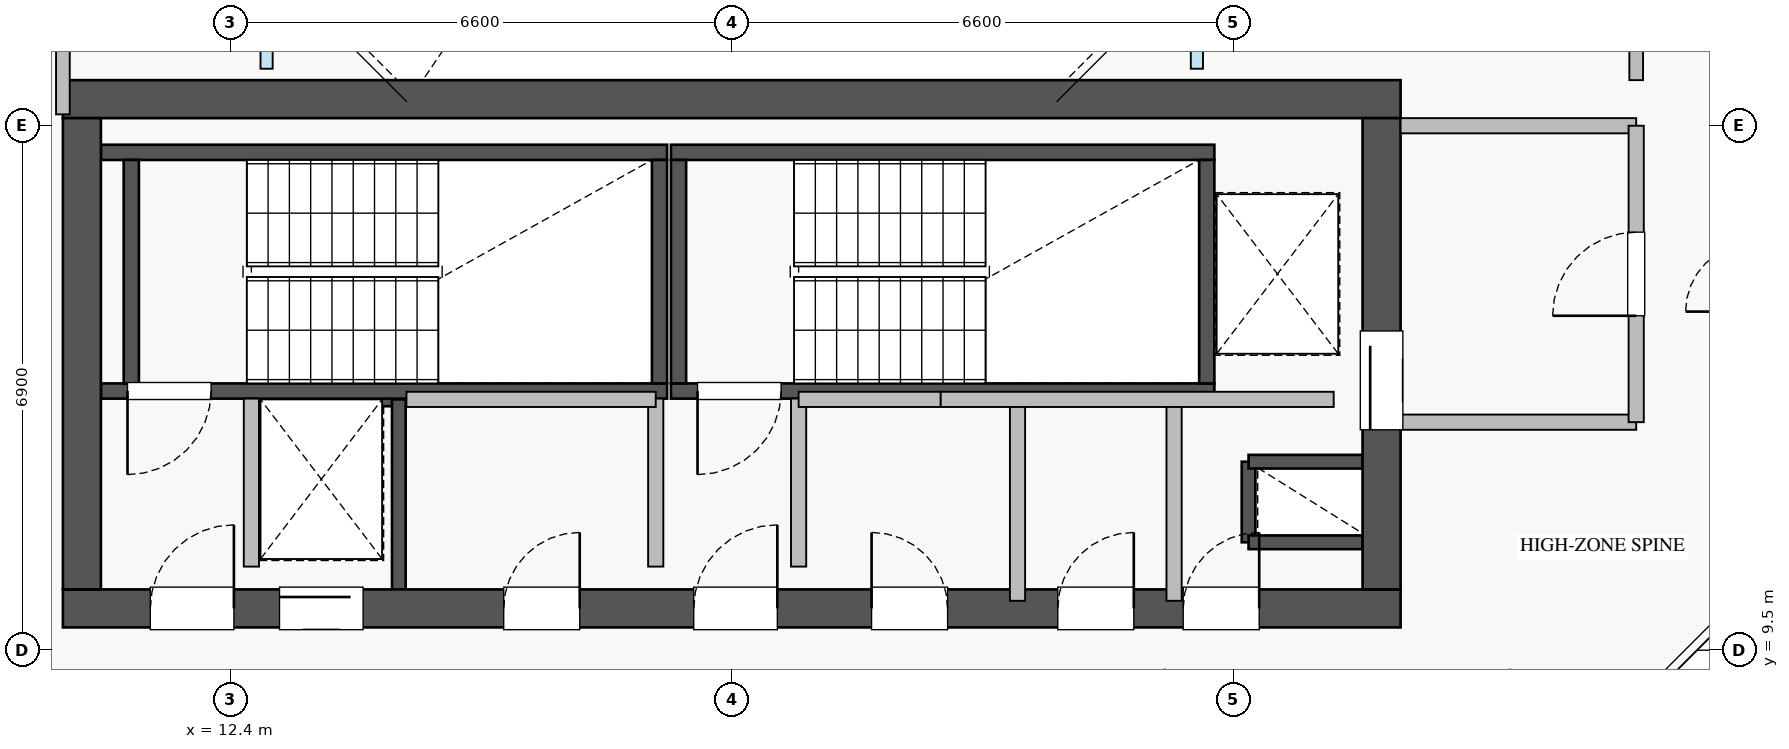
"""IFC4 building model, lengths in metres.
Left out: names, types, materials, properties, quantities, classifications, styles, units other than length and angle.
Written with IfcOpenShell. Run it as: python <this file> out.ifc"""

import sys

from ifc_helpers import new_model, si_unit, direction, frame, frame_2d, origin, place, context, subcontext, project, spatial, rectangle, extrude, source, transform, mapped, element, fill, save


model = new_model("IFC4")
c1 = context("Model", 3, precision=1e-05, world=origin(), true_north=direction((0.0, 1.0)))
c2 = subcontext(c1, "Body", "Model", "MODEL_VIEW")
j1 = project(units=[si_unit("LENGTHUNIT", "METRE"), si_unit("PLANEANGLEUNIT", "RADIAN")], contexts=[c1])
p1 = place(None, origin())
s1 = spatial("IfcSite", under=j1, at=p1, CompositionType="ELEMENT")
p2 = place(p1, origin())
s2 = spatial("IfcBuilding", under=s1, at=p2, CompositionType="ELEMENT")
p3 = place(p2, frame((0.0, 0.0, 210.0)))
s3 = spatial("IfcBuildingStorey", under=s2, at=p3, CompositionType="ELEMENT", Elevation=210.0)
p4 = place(p3, frame((12.68, 12.8, 0.0), z_axis=(0.0, 0.0, 1.0), x_axis=(1.0, 0.0, 0.0)))
e1 = element("IfcWall", 1, at=p4, inside=s3, PredefinedType="SHEAR", context=c2, shape_type="SweptSolid", body=[
    extrude(rectangle(XDim=1.94, YDim=0.18, at=frame_2d((0.97, 0.0))), origin(), (0.0, 0.0, 1.0), 3.07),
])
p5 = place(p3, frame((14.62, 10.3, 0.0), z_axis=(0.0, 0.0, 1.0), x_axis=(0.0, 1.0, 0.0)))
e2 = element("IfcWall", 2, at=p5, inside=s3, PredefinedType="SHEAR", context=c2, shape_type="SweptSolid", body=[
    extrude(rectangle(XDim=2.5, YDim=0.18, at=frame_2d((1.25, 0.0))), origin(), (0.0, 0.0, 1.0), 3.07),
])
p6 = place(p3, frame((25.8, 10.92, 0.0), z_axis=(0.0, 0.0, 1.0), x_axis=(0.0, 1.0, 0.0)))
e3 = element("IfcWall", 3, at=p6, inside=s3, PredefinedType="SHEAR", context=c2, shape_type="SweptSolid", body=[
    extrude(rectangle(XDim=1.06, YDim=0.18, at=frame_2d((0.53, 0.0))), origin(), (0.0, 0.0, 1.0), 3.07),
])
for number, where, z_axis, x_axis in (
    (4, (25.8, 11.98, 0.0), (0.0, 0.0, 1.0), (1.0, 0.0, 0.0)),
    (5, (25.8, 10.92, 0.0), (0.0, 0.0, 1.0), (1.0, 0.0, 0.0)),
):
    element("IfcWall", number, at=place(p3, frame(where, z_axis=z_axis, x_axis=x_axis)), inside=s3, PredefinedType="SHEAR", context=c2, shape_type="SweptSolid", body=[
        extrude(rectangle(XDim=1.5, YDim=0.18, at=frame_2d((0.75, 0.0))), origin(), (0.0, 0.0, 1.0), 3.07),
    ])
p7 = place(p3, frame((10.7, 12.91, 0.0), z_axis=(0.0, 0.0, 1.0), x_axis=(1.0, 0.0, 0.0)))
e6 = element("IfcWall", 6, at=p7, inside=s3, PredefinedType="SHEAR", context=c2, shape_type="SweptSolid", body=[
    extrude(rectangle(XDim=7.45, YDim=0.2, at=frame_2d((3.725, 0.0))), origin(), (0.0, 0.0, 1.0), 3.25),
])
p8 = place(p7, frame((0.35, 0.0, 0.0)))
e7 = element("IfcOpeningElement", 7, at=p8, cuts=e6, PredefinedType="OPENING", context=c2, shape_type="SweptSolid", body=[
    extrude(rectangle(XDim=1.1, YDim=2.05, at=frame_2d((0.55, 1.025))), frame((0.0, 0.11, 0.0), z_axis=(0.0, -1.0, 0.0), x_axis=(1.0, 0.0, 0.0)), (0.0, 0.0, 1.0), 0.22),
])
p9 = place(p3, frame((10.7, 16.05, 0.0), z_axis=(0.0, 0.0, 1.0), x_axis=(1.0, 0.0, 0.0)))
e8 = element("IfcWall", 8, at=p9, inside=s3, PredefinedType="SHEAR", context=c2, shape_type="SweptSolid", body=[
    extrude(rectangle(XDim=7.45, YDim=0.2, at=frame_2d((3.725, 0.0))), origin(), (0.0, 0.0, 1.0), 3.25),
])
for number, where, z_axis, x_axis in (
    (9, (11.1, 13.01, 0.0), (0.0, 0.0, 1.0), (0.0, 1.0, 0.0)),
    (10, (18.05, 13.01, 0.0), (0.0, 0.0, 1.0), (0.0, 1.0, 0.0)),
):
    element("IfcWall", number, at=place(p3, frame(where, z_axis=z_axis, x_axis=x_axis)), inside=s3, PredefinedType="SHEAR", context=c2, shape_type="SweptSolid", body=[
        extrude(rectangle(XDim=2.94, YDim=0.2, at=frame_2d((1.47, 0.0))), origin(), (0.0, 0.0, 1.0), 3.25),
    ])
p10 = place(p3, frame((18.2, 12.91, 0.0), z_axis=(0.0, 0.0, 1.0), x_axis=(1.0, 0.0, 0.0)))
e11 = element("IfcWall", 11, at=p10, inside=s3, PredefinedType="SHEAR", context=c2, shape_type="SweptSolid", body=[
    extrude(rectangle(XDim=7.15, YDim=0.2, at=frame_2d((3.575, 0.0))), origin(), (0.0, 0.0, 1.0), 3.25),
])
p11 = place(p10, frame((0.35, 0.0, 0.0)))
e12 = element("IfcOpeningElement", 12, at=p11, cuts=e11, PredefinedType="OPENING", context=c2, shape_type="SweptSolid", body=[
    extrude(rectangle(XDim=1.1, YDim=2.05, at=frame_2d((0.55, 1.025))), frame((0.0, 0.11, 0.0), z_axis=(0.0, -1.0, 0.0), x_axis=(1.0, 0.0, 0.0)), (0.0, 0.0, 1.0), 0.22),
])
p12 = place(p3, frame((18.2, 16.05, 0.0), z_axis=(0.0, 0.0, 1.0), x_axis=(1.0, 0.0, 0.0)))
e13 = element("IfcWall", 13, at=p12, inside=s3, PredefinedType="SHEAR", context=c2, shape_type="SweptSolid", body=[
    extrude(rectangle(XDim=7.15, YDim=0.2, at=frame_2d((3.575, 0.0))), origin(), (0.0, 0.0, 1.0), 3.25),
])
for number, where, z_axis, x_axis in (
    (14, (18.3, 13.01, 0.0), (0.0, 0.0, 1.0), (0.0, 1.0, 0.0)),
    (15, (25.25, 13.01, 0.0), (0.0, 0.0, 1.0), (0.0, 1.0, 0.0)),
):
    element("IfcWall", number, at=place(p3, frame(where, z_axis=z_axis, x_axis=x_axis)), inside=s3, PredefinedType="SHEAR", context=c2, shape_type="SweptSolid", body=[
        extrude(rectangle(XDim=2.94, YDim=0.2, at=frame_2d((1.47, 0.0))), origin(), (0.0, 0.0, 1.0), 3.25),
    ])
p13 = place(p3, frame((10.2, 10.05, 0.0), z_axis=(0.0, 0.0, 1.0), x_axis=(1.0, 0.0, 0.0)))
e16 = element("IfcWall", 16, at=p13, inside=s3, PredefinedType="SHEAR", context=c2, shape_type="SweptSolid", body=[
    extrude(rectangle(XDim=17.6, YDim=0.5, at=frame_2d((8.8, 0.0))), origin(), (0.0, 0.0, 1.0), 3.25),
])
p14 = place(p13, frame((1.15, 0.0, 0.0)))
e17 = element("IfcOpeningElement", 17, at=p14, cuts=e16, PredefinedType="OPENING", context=c2, shape_type="SweptSolid", body=[
    extrude(rectangle(XDim=1.1, YDim=2.05, at=frame_2d((0.55, 1.025))), frame((0.0, 0.26, 0.0), z_axis=(0.0, -1.0, 0.0), x_axis=(1.0, 0.0, 0.0)), (0.0, 0.0, 1.0), 0.52),
])
p15 = place(p13, frame((8.3, 0.0, 0.0)))
e18 = element("IfcOpeningElement", 18, at=p15, cuts=e16, PredefinedType="OPENING", context=c2, shape_type="SweptSolid", body=[
    extrude(rectangle(XDim=1.1, YDim=2.05, at=frame_2d((0.55, 1.025))), frame((0.0, 0.26, 0.0), z_axis=(0.0, -1.0, 0.0), x_axis=(1.0, 0.0, 0.0)), (0.0, 0.0, 1.0), 0.52),
])
p16 = place(p13, frame((2.85, 0.0, 0.0)))
e19 = element("IfcOpeningElement", 19, at=p16, cuts=e16, PredefinedType="OPENING", context=c2, shape_type="SweptSolid", body=[
    extrude(rectangle(XDim=1.1, YDim=2.05, at=frame_2d((0.55, 1.025))), frame((0.0, 0.26, 0.0), z_axis=(0.0, -1.0, 0.0), x_axis=(1.0, 0.0, 0.0)), (0.0, 0.0, 1.0), 0.52),
])
p17 = place(p13, frame((5.8, 0.0, 0.0)))
e20 = element("IfcOpeningElement", 20, at=p17, cuts=e16, PredefinedType="OPENING", context=c2, shape_type="SweptSolid", body=[
    extrude(rectangle(XDim=1.0, YDim=2.05, at=frame_2d((0.5, 1.025))), frame((0.0, 0.26, 0.0), z_axis=(0.0, -1.0, 0.0), x_axis=(1.0, 0.0, 0.0)), (0.0, 0.0, 1.0), 0.52),
])
p18 = place(p13, frame((14.74, 0.0, 0.0)))
e21 = element("IfcOpeningElement", 21, at=p18, cuts=e16, PredefinedType="OPENING", context=c2, shape_type="SweptSolid", body=[
    extrude(rectangle(XDim=1.0, YDim=2.05, at=frame_2d((0.5, 1.025))), frame((0.0, 0.26, 0.0), z_axis=(0.0, -1.0, 0.0), x_axis=(1.0, 0.0, 0.0)), (0.0, 0.0, 1.0), 0.52),
])
p19 = place(p13, frame((10.64, 0.0, 0.0)))
e22 = element("IfcOpeningElement", 22, at=p19, cuts=e16, PredefinedType="OPENING", context=c2, shape_type="SweptSolid", body=[
    extrude(rectangle(XDim=1.0, YDim=2.05, at=frame_2d((0.5, 1.025))), frame((0.0, 0.26, 0.0), z_axis=(0.0, -1.0, 0.0), x_axis=(1.0, 0.0, 0.0)), (0.0, 0.0, 1.0), 0.52),
])
p20 = place(p13, frame((13.09, 0.0, 0.0)))
e23 = element("IfcOpeningElement", 23, at=p20, cuts=e16, PredefinedType="OPENING", context=c2, shape_type="SweptSolid", body=[
    extrude(rectangle(XDim=1.0, YDim=2.05, at=frame_2d((0.5, 1.025))), frame((0.0, 0.26, 0.0), z_axis=(0.0, -1.0, 0.0), x_axis=(1.0, 0.0, 0.0)), (0.0, 0.0, 1.0), 0.52),
])
p21 = place(p3, frame((10.2, 16.75, 0.0), z_axis=(0.0, 0.0, 1.0), x_axis=(1.0, 0.0, 0.0)))
e24 = element("IfcWall", 24, at=p21, inside=s3, PredefinedType="SHEAR", context=c2, shape_type="SweptSolid", body=[
    extrude(rectangle(XDim=17.6, YDim=0.5, at=frame_2d((8.8, 0.0))), origin(), (0.0, 0.0, 1.0), 3.25),
])
p22 = place(p3, frame((10.45, 10.3, 0.0), z_axis=(0.0, 0.0, 1.0), x_axis=(0.0, 1.0, 0.0)))
e25 = element("IfcWall", 25, at=p22, inside=s3, PredefinedType="SHEAR", context=c2, shape_type="SweptSolid", body=[
    extrude(rectangle(XDim=6.2, YDim=0.5, at=frame_2d((3.1, 0.0))), origin(), (0.0, 0.0, 1.0), 3.25),
])
p23 = place(p3, frame((27.55, 10.3, 0.0), z_axis=(0.0, 0.0, 1.0), x_axis=(0.0, 1.0, 0.0)))
e26 = element("IfcWall", 26, at=p23, inside=s3, PredefinedType="SHEAR", context=c2, shape_type="SweptSolid", body=[
    extrude(rectangle(XDim=6.2, YDim=0.5, at=frame_2d((3.1, 0.0))), origin(), (0.0, 0.0, 1.0), 3.25),
])
p24 = place(p23, frame((2.1, 0.0, 0.0)))
e27 = element("IfcOpeningElement", 27, at=p24, cuts=e26, PredefinedType="OPENING", context=c2, shape_type="SweptSolid", body=[
    extrude(rectangle(XDim=1.3, YDim=2.05, at=frame_2d((0.65, 1.025))), frame((0.0, 0.26, 0.0), z_axis=(0.0, -1.0, 0.0), x_axis=(1.0, 0.0, 0.0)), (0.0, 0.0, 1.0), 0.52),
])
p25 = place(p3, frame((27.8, 16.4, 0.0), z_axis=(0.0, 0.0, 1.0), x_axis=(1.0, 0.0, 0.0)))
e28 = element("IfcWall", 28, at=p25, inside=s3, PredefinedType="PARTITIONING", context=c2, shape_type="SweptSolid", body=[
    extrude(rectangle(XDim=3.1, YDim=0.2, at=frame_2d((1.55, 0.0))), origin(), (0.0, 0.0, 1.0), 3.07),
])
p26 = place(p3, frame((27.8, 12.5, 0.0), z_axis=(0.0, 0.0, 1.0), x_axis=(1.0, 0.0, 0.0)))
e29 = element("IfcWall", 29, at=p26, inside=s3, PredefinedType="PARTITIONING", context=c2, shape_type="SweptSolid", body=[
    extrude(rectangle(XDim=3.1, YDim=0.2, at=frame_2d((1.55, 0.0))), origin(), (0.0, 0.0, 1.0), 2.265),
])
p27 = place(p3, frame((30.9, 12.5, 0.0), z_axis=(0.0, 0.0, 1.0), x_axis=(0.0, 1.0, 0.0)))
e30 = element("IfcWall", 30, at=p27, inside=s3, PredefinedType="PARTITIONING", context=c2, shape_type="SweptSolid", body=[
    extrude(rectangle(XDim=3.9, YDim=0.2, at=frame_2d((1.95, 0.0))), origin(), (0.0, 0.0, 1.0), 3.07),
])
p28 = place(p27, frame((1.4, 0.0, 0.0)))
e31 = element("IfcOpeningElement", 31, at=p28, cuts=e30, PredefinedType="OPENING", context=c2, shape_type="SweptSolid", body=[
    extrude(rectangle(XDim=1.1, YDim=2.05, at=frame_2d((0.55, 1.025))), frame((0.0, 0.11, 0.0), z_axis=(0.0, -1.0, 0.0), x_axis=(1.0, 0.0, 0.0)), (0.0, 0.0, 1.0), 0.22),
])
for number, where, z_axis, x_axis in (
    (32, (12.68, 10.6, 0.0), (0.0, 0.0, 1.0), (0.0, 1.0, 0.0)),
    (33, (18.0, 10.6, 0.0), (0.0, 0.0, 1.0), (0.0, 1.0, 0.0)),
    (34, (19.88, 10.6, 0.0), (0.0, 0.0, 1.0), (0.0, 1.0, 0.0)),
):
    element("IfcWall", number, at=place(p3, frame(where, z_axis=z_axis, x_axis=x_axis)), inside=s3, PredefinedType="PARTITIONING", context=c2, shape_type="SweptSolid", body=[
        extrude(rectangle(XDim=2.21, YDim=0.2, at=frame_2d((1.105, 0.0))), origin(), (0.0, 0.0, 1.0), 3.07),
    ])
p29 = place(p3, frame((14.72, 12.8, 0.0), z_axis=(0.0, 0.0, 1.0), x_axis=(1.0, 0.0, 0.0)))
e35 = element("IfcWall", 35, at=p29, inside=s3, PredefinedType="PARTITIONING", context=c2, shape_type="SweptSolid", body=[
    extrude(rectangle(XDim=3.28, YDim=0.2, at=frame_2d((1.64, 0.0))), origin(), (0.0, 0.0, 1.0), 3.07),
])
p30 = place(p3, frame((24.82, 10.15, 0.0), z_axis=(0.0, 0.0, 1.0), x_axis=(0.0, 1.0, 0.0)))
e36 = element("IfcWall", 36, at=p30, inside=s3, PredefinedType="PARTITIONING", context=c2, shape_type="SweptSolid", body=[
    extrude(rectangle(XDim=2.65, YDim=0.2, at=frame_2d((1.325, 0.0))), origin(), (0.0, 0.0, 1.0), 3.07),
])
p31 = place(p3, frame((19.88, 12.8, 0.0), z_axis=(0.0, 0.0, 1.0), x_axis=(1.0, 0.0, 0.0)))
e37 = element("IfcWall", 37, at=p31, inside=s3, PredefinedType="PARTITIONING", context=c2, shape_type="SweptSolid", body=[
    extrude(rectangle(XDim=1.87, YDim=0.2, at=frame_2d((0.935, 0.0))), origin(), (0.0, 0.0, 1.0), 3.07),
])
p32 = place(p3, frame((22.76, 10.15, 0.0), z_axis=(0.0, 0.0, 1.0), x_axis=(0.0, 1.0, 0.0)))
e38 = element("IfcWall", 38, at=p32, inside=s3, PredefinedType="PARTITIONING", context=c2, shape_type="SweptSolid", body=[
    extrude(rectangle(XDim=2.65, YDim=0.2, at=frame_2d((1.325, 0.0))), origin(), (0.0, 0.0, 1.0), 3.07),
])
p33 = place(p3, frame((21.75, 12.8, 0.0), z_axis=(0.0, 0.0, 1.0), x_axis=(1.0, 0.0, 0.0)))
e39 = element("IfcWall", 39, at=p33, inside=s3, PredefinedType="PARTITIONING", context=c2, shape_type="SweptSolid", body=[
    extrude(rectangle(XDim=5.17, YDim=0.2, at=frame_2d((2.585, 0.0))), origin(), (0.0, 0.0, 1.0), 3.07),
])
p34 = place(p3, frame((10.2, 16.55, 0.0), z_axis=(0.0, 0.0, 1.0), x_axis=(0.0, 1.0, 0.0)))
e40 = element("IfcWall", 40, at=p34, inside=s3, PredefinedType="PARTITIONING", context=c2, shape_type="SweptSolid", body=[
    extrude(rectangle(XDim=4.45, YDim=0.18, at=frame_2d((2.225, 0.0))), origin(), (0.0, 0.0, 1.0), 3.07),
])
p35 = place(p34, frame((2.025, 0.0, 0.0)))
e41 = element("IfcOpeningElement", 41, at=p35, cuts=e40, PredefinedType="OPENING", context=c2, shape_type="SweptSolid", body=[
    extrude(rectangle(XDim=0.85, YDim=2.05, at=frame_2d((0.425, 1.025))), frame((0.0, 0.1, 0.0), z_axis=(0.0, -1.0, 0.0), x_axis=(1.0, 0.0, 0.0)), (0.0, 0.0, 1.0), 0.2),
])
p36 = place(p3, frame((30.9, 17.0, 0.0), z_axis=(0.0, 0.0, 1.0), x_axis=(0.0, 1.0, 0.0)))
e42 = element("IfcWall", 42, at=p36, inside=s3, PredefinedType="PARTITIONING", context=c2, shape_type="SweptSolid", body=[
    extrude(rectangle(XDim=12.0, YDim=0.18, at=frame_2d((6.0, 0.0))), origin(), (0.0, 0.0, 1.0), 3.07),
])
p37 = place(p36, frame((1.5, 0.0, 0.0)))
e43 = element("IfcOpeningElement", 43, at=p37, cuts=e42, PredefinedType="OPENING", context=c2, shape_type="SweptSolid", body=[
    extrude(rectangle(XDim=1.0, YDim=2.05, at=frame_2d((0.5, 1.025))), frame((0.0, 0.1, 0.0), z_axis=(0.0, -1.0, 0.0), x_axis=(1.0, 0.0, 0.0)), (0.0, 0.0, 1.0), 0.2),
])
p38 = place(p36, frame((5.5, 0.0, 0.0)))
e44 = element("IfcOpeningElement", 44, at=p38, cuts=e42, PredefinedType="OPENING", context=c2, shape_type="SweptSolid", body=[
    extrude(rectangle(XDim=1.0, YDim=2.05, at=frame_2d((0.5, 1.025))), frame((0.0, 0.1, 0.0), z_axis=(0.0, -1.0, 0.0), x_axis=(1.0, 0.0, 0.0)), (0.0, 0.0, 1.0), 0.2),
])
p39 = place(p36, frame((9.5, 0.0, 0.0)))
e45 = element("IfcOpeningElement", 45, at=p39, cuts=e42, PredefinedType="OPENING", context=c2, shape_type="SweptSolid", body=[
    extrude(rectangle(XDim=1.0, YDim=2.05, at=frame_2d((0.5, 1.025))), frame((0.0, 0.1, 0.0), z_axis=(0.0, -1.0, 0.0), x_axis=(1.0, 0.0, 0.0)), (0.0, 0.0, 1.0), 0.2),
])
m1 = source(origin(), c2, "Body", "SweptSolid", [
    extrude(rectangle(XDim=1.3, YDim=2.05, at=frame_2d((0.65, 1.025))), frame((0.0, 0.025, 0.0), z_axis=(0.0, -1.0, 0.0), x_axis=(1.0, 0.0, 0.0)), (0.0, 0.0, 1.0), 0.05),
])
p40 = place(p24, origin())
e46 = element("IfcDoor", 46, at=p40, inside=s3, OperationType="SLIDING_TO_RIGHT", PredefinedType="DOOR", context=c2, shape_type="MappedRepresentation", body=[
    mapped(m1, transform((0.0, 0.0, 0.0), x_axis=(1.0, 0.0, 0.0), y_axis=(0.0, 1.0, 0.0), z_axis=(0.0, 0.0, 1.0), scale=1.0)),
])
fill(e27, e46)
m2 = source(origin(), c2, "Body", "SweptSolid", [
    extrude(rectangle(XDim=1.1, YDim=2.05, at=frame_2d((0.55, 1.025))), frame((0.0, 0.025, 0.0), z_axis=(0.0, -1.0, 0.0), x_axis=(1.0, 0.0, 0.0)), (0.0, 0.0, 1.0), 0.05),
])
p41 = place(p14, origin())
e47 = element("IfcDoor", 47, at=p41, inside=s3, OperationType="SINGLE_SWING_RIGHT", PredefinedType="DOOR", context=c2, shape_type="MappedRepresentation", body=[
    mapped(m2, transform((0.0, 0.0, 0.0), x_axis=(1.0, 0.0, 0.0), y_axis=(0.0, 1.0, 0.0), z_axis=(0.0, 0.0, 1.0), scale=1.0)),
])
fill(e17, e47)
p42 = place(p8, frame((1.1, 0.0, 0.0), z_axis=(0.0, 0.0, 1.0), x_axis=(-1.0, 0.0, 0.0)))
e48 = element("IfcDoor", 48, at=p42, inside=s3, OperationType="SINGLE_SWING_LEFT", PredefinedType="DOOR", context=c2, shape_type="MappedRepresentation", body=[
    mapped(m2, transform((0.0, 0.0, 0.0), x_axis=(1.0, 0.0, 0.0), y_axis=(0.0, 1.0, 0.0), z_axis=(0.0, 0.0, 1.0), scale=1.0)),
])
fill(e7, e48)
p43 = place(p15, origin())
e49 = element("IfcDoor", 49, at=p43, inside=s3, OperationType="SINGLE_SWING_RIGHT", PredefinedType="DOOR", context=c2, shape_type="MappedRepresentation", body=[
    mapped(m2, transform((0.0, 0.0, 0.0), x_axis=(1.0, 0.0, 0.0), y_axis=(0.0, 1.0, 0.0), z_axis=(0.0, 0.0, 1.0), scale=1.0)),
])
fill(e18, e49)
p44 = place(p11, frame((1.1, 0.0, 0.0), z_axis=(0.0, 0.0, 1.0), x_axis=(-1.0, 0.0, 0.0)))
e50 = element("IfcDoor", 50, at=p44, inside=s3, OperationType="SINGLE_SWING_LEFT", PredefinedType="DOOR", context=c2, shape_type="MappedRepresentation", body=[
    mapped(m2, transform((0.0, 0.0, 0.0), x_axis=(1.0, 0.0, 0.0), y_axis=(0.0, 1.0, 0.0), z_axis=(0.0, 0.0, 1.0), scale=1.0)),
])
fill(e12, e50)
p45 = place(p16, origin())
e51 = element("IfcDoor", 51, at=p45, inside=s3, OperationType="SLIDING_TO_RIGHT", PredefinedType="DOOR", context=c2, shape_type="MappedRepresentation", body=[
    mapped(m2, transform((0.0, 0.0, 0.0), x_axis=(1.0, 0.0, 0.0), y_axis=(0.0, 1.0, 0.0), z_axis=(0.0, 0.0, 1.0), scale=1.0)),
])
fill(e19, e51)
m3 = source(origin(), c2, "Body", "SweptSolid", [
    extrude(rectangle(XDim=1.0, YDim=2.05, at=frame_2d((0.5, 1.025))), frame((0.0, 0.025, 0.0), z_axis=(0.0, -1.0, 0.0), x_axis=(1.0, 0.0, 0.0)), (0.0, 0.0, 1.0), 0.05),
])
p46 = place(p17, origin())
e52 = element("IfcDoor", 52, at=p46, inside=s3, OperationType="SINGLE_SWING_RIGHT", PredefinedType="DOOR", context=c2, shape_type="MappedRepresentation", body=[
    mapped(m3, transform((0.0, 0.0, 0.0), x_axis=(1.0, 0.0, 0.0), y_axis=(0.0, 1.0, 0.0), z_axis=(0.0, 0.0, 1.0), scale=1.0)),
])
fill(e20, e52)
p47 = place(p18, origin())
e53 = element("IfcDoor", 53, at=p47, inside=s3, OperationType="SINGLE_SWING_RIGHT", PredefinedType="DOOR", context=c2, shape_type="MappedRepresentation", body=[
    mapped(m3, transform((0.0, 0.0, 0.0), x_axis=(1.0, 0.0, 0.0), y_axis=(0.0, 1.0, 0.0), z_axis=(0.0, 0.0, 1.0), scale=1.0)),
])
fill(e21, e53)
p48 = place(p19, origin())
e54 = element("IfcDoor", 54, at=p48, inside=s3, OperationType="SINGLE_SWING_LEFT", PredefinedType="DOOR", context=c2, shape_type="MappedRepresentation", body=[
    mapped(m3, transform((0.0, 0.0, 0.0), x_axis=(1.0, 0.0, 0.0), y_axis=(0.0, 1.0, 0.0), z_axis=(0.0, 0.0, 1.0), scale=1.0)),
])
fill(e22, e54)
p49 = place(p20, origin())
e55 = element("IfcDoor", 55, at=p49, inside=s3, OperationType="SINGLE_SWING_RIGHT", PredefinedType="DOOR", context=c2, shape_type="MappedRepresentation", body=[
    mapped(m3, transform((0.0, 0.0, 0.0), x_axis=(1.0, 0.0, 0.0), y_axis=(0.0, 1.0, 0.0), z_axis=(0.0, 0.0, 1.0), scale=1.0)),
])
fill(e23, e55)
p50 = place(p28, origin())
e56 = element("IfcDoor", 56, at=p50, inside=s3, OperationType="SINGLE_SWING_LEFT", PredefinedType="DOOR", context=c2, shape_type="MappedRepresentation", body=[
    mapped(m2, transform((0.0, 0.0, 0.0), x_axis=(1.0, 0.0, 0.0), y_axis=(0.0, 1.0, 0.0), z_axis=(0.0, 0.0, 1.0), scale=1.0)),
])
fill(e31, e56)
save(model, sys.argv[1])
